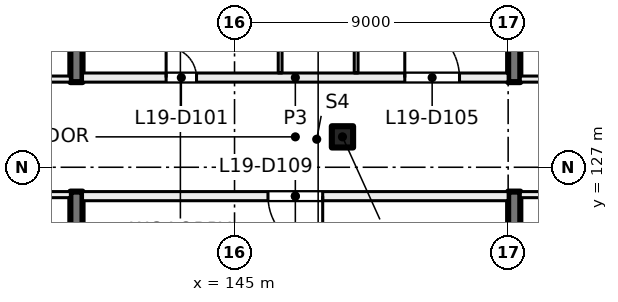
"""IFC4 building model, lengths in metres.
Left out: names, types, materials, properties, quantities, classifications, styles, units other than length and angle.
Written with IfcOpenShell. Run it as: python <this file> out.ifc"""

import sys

from ifc_helpers import new_model, si_unit, direction, frame, frame_2d, origin, origin_2d, place, context, subcontext, project, spatial, rectangle, extrude, element, fill, save


model = new_model("IFC4")
c1 = context("Model", 3, precision=1e-05, world=origin(), true_north=direction((0.0, 1.0)))
c2 = subcontext(c1, "Body", "Model", "MODEL_VIEW")
j1 = project(units=[si_unit("LENGTHUNIT", "METRE"), si_unit("PLANEANGLEUNIT", "RADIAN")], contexts=[c1])
p1 = place(None, origin())
s1 = spatial("IfcSite", under=j1, at=p1, CompositionType="ELEMENT")
p2 = place(p1, origin())
s2 = spatial("IfcBuilding", under=s1, at=p2, CompositionType="ELEMENT")
p3 = place(p2, frame((0.0, 0.0, 85.0)))
s3 = spatial("IfcBuildingStorey", under=s2, at=p3, CompositionType="ELEMENT", Elevation=85.0)
p4 = place(p3, frame((148.55, 128.0, 0.0), z_axis=(0.0, 0.0, 1.0), x_axis=(1.0, 0.0, 0.0)))
e1 = element("IfcColumn", 1, at=p4, inside=s3, PredefinedType="COLUMN", context=c2, shape_type="SweptSolid", body=[
    extrude(rectangle(XDim=0.7, YDim=0.7, at=origin_2d()), origin(), (0.0, 0.0, 1.0), 4.0),
])
for number, where, z_axis, x_axis in (
    (2, (139.8, 117.6, 0.0), (0.0, 0.0, 1.0), (0.0, 1.0, 0.0)),
    (3, (139.8, 129.8, 0.0), (0.0, 0.0, 1.0), (0.0, 1.0, 0.0)),
    (4, (154.2, 138.4, 0.0), (0.0, 0.0, 1.0), (0.0, -1.0, 0.0)),
    (5, (154.2, 126.2, 0.0), (0.0, 0.0, 1.0), (0.0, -1.0, 0.0)),
):
    element("IfcWall", number, at=place(p3, frame(where, z_axis=z_axis, x_axis=x_axis)), inside=s3, PredefinedType="SHEAR", context=c2, shape_type="SweptSolid", body=[
        extrude(rectangle(XDim=8.6, YDim=0.4, at=frame_2d((4.3, 0.0))), origin(), (0.0, 0.0, 1.0), 4.0),
    ])
p5 = place(p3, frame((135.0, 129.9, 0.0), z_axis=(0.0, 0.0, 1.0), x_axis=(1.0, 0.0, 0.0)))
e6 = element("IfcWall", 6, at=p5, inside=s3, PredefinedType="PARTITIONING", context=c2, shape_type="SweptSolid", body=[
    extrude(rectangle(XDim=4.6, YDim=0.2, at=frame_2d((2.3, 0.0))), origin(), (0.0, 0.0, 1.0), 3.625),
])
p6 = place(p5, frame((1.7, 0.0, 0.0)))
e7 = element("IfcOpeningElement", 7, at=p6, cuts=e6, PredefinedType="OPENING", context=c2, shape_type="SweptSolid", body=[
    extrude(rectangle(XDim=1.2, YDim=2.1, at=frame_2d((0.6, 1.05))), frame((0.0, 0.11, 0.0), z_axis=(0.0, -1.0, 0.0), x_axis=(1.0, 0.0, 0.0)), (0.0, 0.0, 1.0), 0.22),
])
p7 = place(p3, frame((139.6, 126.1, 0.0), z_axis=(0.0, 0.0, 1.0), x_axis=(-1.0, 0.0, 0.0)))
e8 = element("IfcWall", 8, at=p7, inside=s3, PredefinedType="PARTITIONING", context=c2, shape_type="SweptSolid", body=[
    extrude(rectangle(XDim=4.6, YDim=0.2, at=frame_2d((2.3, 0.0))), origin(), (0.0, 0.0, 1.0), 3.625),
])
p8 = place(p7, frame((1.7, 0.0, 0.0)))
e9 = element("IfcOpeningElement", 9, at=p8, cuts=e8, PredefinedType="OPENING", context=c2, shape_type="SweptSolid", body=[
    extrude(rectangle(XDim=1.2, YDim=2.1, at=frame_2d((0.6, 1.05))), frame((0.0, 0.11, 0.0), z_axis=(0.0, -1.0, 0.0), x_axis=(1.0, 0.0, 0.0)), (0.0, 0.0, 1.0), 0.22),
])
p9 = place(p3, frame((163.8, 126.1, 0.0), z_axis=(0.0, 0.0, 1.0), x_axis=(-1.0, 0.0, 0.0)))
e10 = element("IfcWall", 10, at=p9, inside=s3, PredefinedType="PARTITIONING", context=c2, shape_type="SweptSolid", body=[
    extrude(rectangle(XDim=9.4, YDim=0.2, at=frame_2d((4.7, 0.0))), origin(), (0.0, 0.0, 1.0), 3.625),
])
p10 = place(p9, frame((4.1, 0.0, 0.0)))
e11 = element("IfcOpeningElement", 11, at=p10, cuts=e10, PredefinedType="OPENING", context=c2, shape_type="SweptSolid", body=[
    extrude(rectangle(XDim=1.2, YDim=2.1, at=frame_2d((0.6, 1.05))), frame((0.0, 0.11, 0.0), z_axis=(0.0, -1.0, 0.0), x_axis=(1.0, 0.0, 0.0)), (0.0, 0.0, 1.0), 0.22),
])
p11 = place(p3, frame((154.4, 129.9, 0.0), z_axis=(0.0, 0.0, 1.0), x_axis=(1.0, 0.0, 0.0)))
e12 = element("IfcWall", 12, at=p11, inside=s3, PredefinedType="PARTITIONING", context=c2, shape_type="SweptSolid", body=[
    extrude(rectangle(XDim=9.4, YDim=0.2, at=frame_2d((4.7, 0.0))), origin(), (0.0, 0.0, 1.0), 3.625),
])
p12 = place(p11, frame((4.1, 0.0, 0.0)))
e13 = element("IfcOpeningElement", 13, at=p12, cuts=e12, PredefinedType="OPENING", context=c2, shape_type="SweptSolid", body=[
    extrude(rectangle(XDim=1.2, YDim=2.1, at=frame_2d((0.6, 1.05))), frame((0.0, 0.11, 0.0), z_axis=(0.0, -1.0, 0.0), x_axis=(1.0, 0.0, 0.0)), (0.0, 0.0, 1.0), 0.22),
])
p13 = place(p3, frame((140.0, 129.95, 0.0), z_axis=(0.0, 0.0, 1.0), x_axis=(1.0, 0.0, 0.0)))
e14 = element("IfcWall", 14, at=p13, inside=s3, PredefinedType="PARTITIONING", context=c2, shape_type="SweptSolid", body=[
    extrude(rectangle(XDim=14.0, YDim=0.3, at=frame_2d((7.0, 0.0))), origin(), (0.0, 0.0, 1.0), 3.625),
])
p14 = place(p13, frame((2.75, 0.0, 0.0)))
e15 = element("IfcOpeningElement", 15, at=p14, cuts=e14, PredefinedType="OPENING", context=c2, shape_type="SweptSolid", body=[
    extrude(rectangle(XDim=1.0, YDim=2.1, at=frame_2d((0.5, 1.05))), frame((0.0, 0.16, 0.0), z_axis=(0.0, -1.0, 0.0), x_axis=(1.0, 0.0, 0.0)), (0.0, 0.0, 1.0), 0.32),
])
p15 = place(p13, frame((10.6, 0.0, 0.0)))
e16 = element("IfcOpeningElement", 16, at=p15, cuts=e14, PredefinedType="OPENING", context=c2, shape_type="SweptSolid", body=[
    extrude(rectangle(XDim=1.8, YDim=2.1, at=frame_2d((0.9, 1.05))), frame((0.0, 0.16, 0.0), z_axis=(0.0, -1.0, 0.0), x_axis=(1.0, 0.0, 0.0)), (0.0, 0.0, 1.0), 0.32),
])
p16 = place(p3, frame((146.5, 132.688, 0.0), z_axis=(0.0, 0.0, 1.0), x_axis=(0.0, -1.0, 0.0)))
e17 = element("IfcWall", 17, at=p16, inside=s3, PredefinedType="PARTITIONING", context=c2, shape_type="SweptSolid", body=[
    extrude(rectangle(XDim=2.588, YDim=0.125, at=frame_2d((1.294, 0.0))), origin(), (0.0, 0.0, 1.0), 3.625),
])
p17 = place(p16, frame((0.794, 0.0, 0.0)))
e18 = element("IfcOpeningElement", 18, at=p17, cuts=e17, PredefinedType="OPENING", context=c2, shape_type="SweptSolid", body=[
    extrude(rectangle(XDim=1.0, YDim=2.1, at=frame_2d((0.5, 1.05))), frame((0.0, 0.073, 0.0), z_axis=(0.0, -1.0, 0.0), x_axis=(1.0, 0.0, 0.0)), (0.0, 0.0, 1.0), 0.145),
])
p18 = place(p3, frame((149.0, 139.012, 0.0), z_axis=(0.0, 0.0, 1.0), x_axis=(0.0, -1.0, 0.0)))
e19 = element("IfcWall", 19, at=p18, inside=s3, PredefinedType="PARTITIONING", context=c2, shape_type="SweptSolid", body=[
    extrude(rectangle(XDim=8.912, YDim=0.125, at=frame_2d((4.456, 0.0))), origin(), (0.0, 0.0, 1.0), 3.625),
])
p19 = place(p3, frame((154.0, 126.05, 0.0), z_axis=(0.0, 0.0, 1.0), x_axis=(-1.0, 0.0, 0.0)))
e20 = element("IfcWall", 20, at=p19, inside=s3, PredefinedType="PARTITIONING", context=c2, shape_type="SweptSolid", body=[
    extrude(rectangle(XDim=14.0, YDim=0.3, at=frame_2d((7.0, 0.0))), origin(), (0.0, 0.0, 1.0), 3.625),
])
p20 = place(p19, frame((6.1, 0.0, 0.0)))
e21 = element("IfcOpeningElement", 21, at=p20, cuts=e20, PredefinedType="OPENING", context=c2, shape_type="SweptSolid", body=[
    extrude(rectangle(XDim=1.8, YDim=2.1, at=frame_2d((0.9, 1.05))), frame((0.0, 0.16, 0.0), z_axis=(0.0, -1.0, 0.0), x_axis=(1.0, 0.0, 0.0)), (0.0, 0.0, 1.0), 0.32),
])
p21 = place(p14, origin())
e22 = element("IfcDoor", 22, at=p21, inside=s3, OperationType="SINGLE_SWING_LEFT", PredefinedType="DOOR", context=c2, shape_type="SweptSolid", body=[
    extrude(rectangle(XDim=1.0, YDim=2.1, at=frame_2d((0.5, 1.05))), frame((0.0, 0.025, 0.0), z_axis=(0.0, -1.0, 0.0), x_axis=(1.0, 0.0, 0.0)), (0.0, 0.0, 1.0), 0.05),
])
fill(e15, e22)
p22 = place(p15, origin())
e23 = element("IfcDoor", 23, at=p22, inside=s3, OperationType="DOUBLE_DOOR_SINGLE_SWING", PredefinedType="DOOR", context=c2, shape_type="SweptSolid", body=[
    extrude(rectangle(XDim=1.8, YDim=2.1, at=frame_2d((0.9, 1.05))), frame((0.0, 0.025, 0.0), z_axis=(0.0, -1.0, 0.0), x_axis=(1.0, 0.0, 0.0)), (0.0, 0.0, 1.0), 0.05),
])
fill(e16, e23)
p23 = place(p20, origin())
e24 = element("IfcDoor", 24, at=p23, inside=s3, OperationType="DOUBLE_DOOR_SINGLE_SWING", PredefinedType="DOOR", context=c2, shape_type="SweptSolid", body=[
    extrude(rectangle(XDim=1.8, YDim=2.1, at=frame_2d((0.9, 1.05))), frame((0.0, 0.025, 0.0), z_axis=(0.0, -1.0, 0.0), x_axis=(1.0, 0.0, 0.0)), (0.0, 0.0, 1.0), 0.05),
])
fill(e21, e24)
save(model, sys.argv[1])
